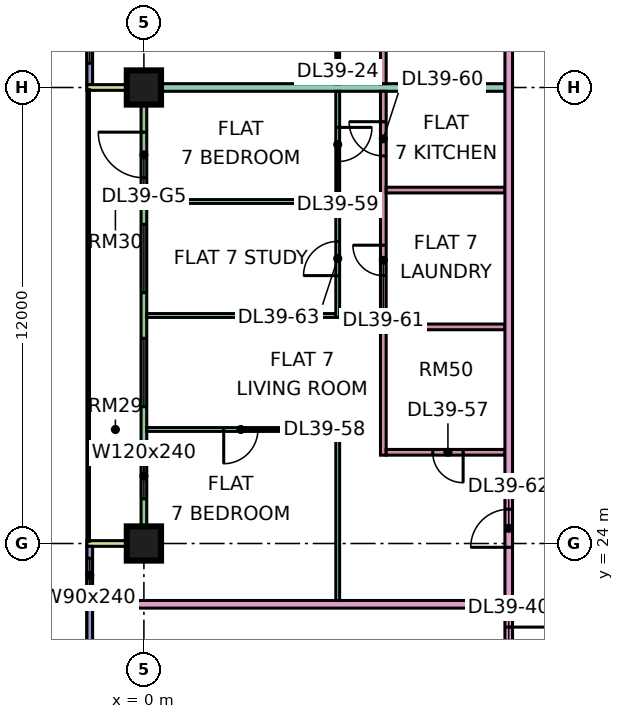
"""IFC4 building model, lengths in metres.
Left out: names, types, materials, properties, quantities, classifications, styles, units other than length and angle.
Written with IfcOpenShell. Run it as: python <this file> out.ifc"""

import sys

from ifc_helpers import new_model, si_unit, direction, frame, frame_2d, origin, origin_2d, place, context, subcontext, project, spatial, rectangle, extrude, element, fill, save


model = new_model("IFC4")
c1 = context("Model", 3, precision=1e-05, world=origin(), true_north=direction((0.0, 1.0)))
c2 = subcontext(c1, "Body", "Model", "MODEL_VIEW")
j1 = project(units=[si_unit("LENGTHUNIT", "METRE"), si_unit("PLANEANGLEUNIT", "RADIAN")], contexts=[c1])
p1 = place(None, origin())
s1 = spatial("IfcSite", under=j1, at=p1, CompositionType="ELEMENT")
p2 = place(p1, origin())
s2 = spatial("IfcBuilding", under=s1, at=p2, CompositionType="ELEMENT")
p3 = place(p2, frame((0.0, 0.0, 172.4)))
s3 = spatial("IfcBuildingStorey", under=s2, at=p3, CompositionType="ELEMENT", Elevation=172.4)
p4 = place(p3, frame((0.0, 24.0, 0.0), z_axis=(0.0, 0.0, 1.0), x_axis=(1.0, 0.0, 0.0)))
e1 = element("IfcColumn", 1, at=p4, inside=s3, PredefinedType="COLUMN", context=c2, shape_type="SweptSolid", body=[
    extrude(rectangle(XDim=0.9, YDim=0.9, at=origin_2d()), origin(), (0.0, 0.0, 1.0), 3.75),
])
p5 = place(p3, frame((0.0, 36.0, 0.0), z_axis=(0.0, 0.0, 1.0), x_axis=(1.0, 0.0, 0.0)))
e2 = element("IfcColumn", 2, at=p5, inside=s3, PredefinedType="COLUMN", context=c2, shape_type="SweptSolid", body=[
    extrude(rectangle(XDim=0.9, YDim=0.9, at=origin_2d()), origin(), (0.0, 0.0, 1.0), 3.75),
])
p6 = place(p3, frame((-1.425, 47.925, 0.0), z_axis=(0.0, 0.0, 1.0), x_axis=(0.0, -1.0, 0.0)))
e3 = element("IfcWall", 3, at=p6, inside=s3, PredefinedType="SOLIDWALL", context=c2, shape_type="SweptSolid", body=[
    extrude(rectangle(XDim=11.85, YDim=0.15, at=frame_2d((5.925, 0.0))), origin(), (0.0, 0.0, 1.0), 3.35),
])
p7 = place(p6, frame((0.562, 0.0, 0.45)))
e4 = element("IfcOpeningElement", 4, at=p7, cuts=e3, PredefinedType="OPENING", context=c2, shape_type="SweptSolid", body=[
    extrude(rectangle(XDim=1.8, YDim=2.4, at=frame_2d((0.9, 1.2))), frame((0.0, 0.085, 0.0), z_axis=(0.0, -1.0, 0.0), x_axis=(1.0, 0.0, 0.0)), (0.0, 0.0, 1.0), 0.17),
])
p8 = place(p6, frame((3.525, 0.0, 0.45)))
e5 = element("IfcOpeningElement", 5, at=p8, cuts=e3, PredefinedType="OPENING", context=c2, shape_type="SweptSolid", body=[
    extrude(rectangle(XDim=1.8, YDim=2.4, at=frame_2d((0.9, 1.2))), frame((0.0, 0.085, 0.0), z_axis=(0.0, -1.0, 0.0), x_axis=(1.0, 0.0, 0.0)), (0.0, 0.0, 1.0), 0.17),
])
p9 = place(p6, frame((6.525, 0.0, 0.45)))
e6 = element("IfcOpeningElement", 6, at=p9, cuts=e3, PredefinedType="OPENING", context=c2, shape_type="SweptSolid", body=[
    extrude(rectangle(XDim=1.8, YDim=2.4, at=frame_2d((0.9, 1.2))), frame((0.0, 0.085, 0.0), z_axis=(0.0, -1.0, 0.0), x_axis=(1.0, 0.0, 0.0)), (0.0, 0.0, 1.0), 0.17),
])
p10 = place(p6, frame((9.488, 0.0, 0.45)))
e7 = element("IfcOpeningElement", 7, at=p10, cuts=e3, PredefinedType="OPENING", context=c2, shape_type="SweptSolid", body=[
    extrude(rectangle(XDim=1.8, YDim=2.4, at=frame_2d((0.9, 1.2))), frame((0.0, 0.085, 0.0), z_axis=(0.0, -1.0, 0.0), x_axis=(1.0, 0.0, 0.0)), (0.0, 0.0, 1.0), 0.17),
])
p11 = place(p3, frame((0.0, 35.925, 0.0), z_axis=(0.0, 0.0, 1.0), x_axis=(0.0, -1.0, 0.0)))
e8 = element("IfcWall", 8, at=p11, inside=s3, PredefinedType="SOLIDWALL", context=c2, shape_type="SweptSolid", body=[
    extrude(rectangle(XDim=11.85, YDim=0.15, at=frame_2d((5.925, 0.0))), origin(), (0.0, 0.0, 1.0), 3.35),
])
p12 = place(p11, frame((1.1, 0.0, 0.0)))
e9 = element("IfcOpeningElement", 9, at=p12, cuts=e8, PredefinedType="OPENING", context=c2, shape_type="SweptSolid", body=[
    extrude(rectangle(XDim=1.2, YDim=2.4, at=frame_2d((0.6, 1.2))), frame((0.0, 0.085, 0.0), z_axis=(0.0, -1.0, 0.0), x_axis=(1.0, 0.0, 0.0)), (0.0, 0.0, 1.0), 0.17),
])
p13 = place(p11, frame((3.525, 0.0, 0.45)))
e10 = element("IfcOpeningElement", 10, at=p13, cuts=e8, PredefinedType="OPENING", context=c2, shape_type="SweptSolid", body=[
    extrude(rectangle(XDim=1.8, YDim=2.4, at=frame_2d((0.9, 1.2))), frame((0.0, 0.085, 0.0), z_axis=(0.0, -1.0, 0.0), x_axis=(1.0, 0.0, 0.0)), (0.0, 0.0, 1.0), 0.17),
])
p14 = place(p11, frame((6.525, 0.0, 0.45)))
e11 = element("IfcOpeningElement", 11, at=p14, cuts=e8, PredefinedType="OPENING", context=c2, shape_type="SweptSolid", body=[
    extrude(rectangle(XDim=1.8, YDim=2.4, at=frame_2d((0.9, 1.2))), frame((0.0, 0.085, 0.0), z_axis=(0.0, -1.0, 0.0), x_axis=(1.0, 0.0, 0.0)), (0.0, 0.0, 1.0), 0.17),
])
p15 = place(p11, frame((9.55, 0.0, 0.45)))
e12 = element("IfcOpeningElement", 12, at=p15, cuts=e8, PredefinedType="OPENING", context=c2, shape_type="SweptSolid", body=[
    extrude(rectangle(XDim=1.2, YDim=2.4, at=frame_2d((0.6, 1.2))), frame((0.0, 0.085, 0.0), z_axis=(0.0, -1.0, 0.0), x_axis=(1.0, 0.0, 0.0)), (0.0, 0.0, 1.0), 0.17),
])
for number, where, z_axis, x_axis in (
    (13, (-1.5, 36.0, 0.0), (0.0, 0.0, 1.0), (1.0, 0.0, 0.0)),
    (14, (-1.5, 24.0, 0.0), (0.0, 0.0, 1.0), (1.0, 0.0, 0.0)),
):
    element("IfcWall", number, at=place(p3, frame(where, z_axis=z_axis, x_axis=x_axis)), inside=s3, PredefinedType="SOLIDWALL", context=c2, shape_type="SweptSolid", body=[
        extrude(rectangle(XDim=1.5, YDim=0.15, at=frame_2d((0.75, 0.0))), origin(), (0.0, 0.0, 1.0), 3.35),
    ])
p16 = place(p3, frame((-1.425, 23.925, 0.0), z_axis=(0.0, 0.0, 1.0), x_axis=(0.0, -1.0, 0.0)))
e15 = element("IfcWall", 15, at=p16, inside=s3, PredefinedType="SOLIDWALL", context=c2, shape_type="SweptSolid", body=[
    extrude(rectangle(XDim=11.425, YDim=0.15, at=frame_2d((5.712, 0.0))), origin(), (0.0, 0.0, 1.0), 3.35),
])
p17 = place(p16, frame((0.312, 0.0, 0.45)))
e16 = element("IfcOpeningElement", 16, at=p17, cuts=e15, PredefinedType="OPENING", context=c2, shape_type="SweptSolid", body=[
    extrude(rectangle(XDim=0.9, YDim=2.4, at=frame_2d((0.45, 1.2))), frame((0.0, 0.085, 0.0), z_axis=(0.0, -1.0, 0.0), x_axis=(1.0, 0.0, 0.0)), (0.0, 0.0, 1.0), 0.17),
])
p18 = place(p16, frame((6.175, 0.0, 0.45)))
e17 = element("IfcOpeningElement", 17, at=p18, cuts=e15, PredefinedType="OPENING", context=c2, shape_type="SweptSolid", body=[
    extrude(rectangle(XDim=3.0, YDim=2.4, at=frame_2d((1.5, 1.2))), frame((0.0, 0.085, 0.0), z_axis=(0.0, -1.0, 0.0), x_axis=(1.0, 0.0, 0.0)), (0.0, 0.0, 1.0), 0.17),
])
p19 = place(p3, frame((-1.35, 22.4, 0.0), z_axis=(0.0, 0.0, 1.0), x_axis=(1.0, 0.0, 0.0)))
e18 = element("IfcWall", 18, at=p19, inside=s3, PredefinedType="PARTITIONING", context=c2, shape_type="SweptSolid", body=[
    extrude(rectangle(XDim=10.85, YDim=0.2, at=frame_2d((5.425, 0.0))), origin(), (0.0, 0.0, 1.0), 3.35),
])
e19 = element("IfcWall", 19, at=p5, inside=s3, PredefinedType="PARTITIONING", context=c2, shape_type="SweptSolid", body=[
    extrude(rectangle(XDim=9.5, YDim=0.2, at=frame_2d((4.75, 0.0))), origin(), (0.0, 0.0, 1.0), 3.35),
])
p20 = place(p3, frame((0.074, 27.0, 0.0), z_axis=(0.0, 0.0, 1.0), x_axis=(1.0, 0.0, 0.0)))
e20 = element("IfcWall", 20, at=p20, inside=s3, PredefinedType="PARTITIONING", context=c2, shape_type="SweptSolid", body=[
    extrude(rectangle(XDim=5.076, YDim=0.1, at=frame_2d((2.538, 0.0))), origin(), (0.0, 0.0, 1.0), 3.35),
])
p21 = place(p20, frame((2.026, 0.0, 0.0)))
e21 = element("IfcOpeningElement", 21, at=p21, cuts=e20, PredefinedType="OPENING", context=c2, shape_type="SweptSolid", body=[
    extrude(rectangle(XDim=0.9, YDim=2.1, at=frame_2d((0.45, 1.05))), frame((0.0, 0.06, 0.0), z_axis=(0.0, -1.0, 0.0), x_axis=(1.0, 0.0, 0.0)), (0.0, 0.0, 1.0), 0.12),
])
for number, where, z_axis, x_axis in (
    (22, (0.074, 30.0, 0.0), (0.0, 0.0, 1.0), (1.0, 0.0, 0.0)),
    (23, (0.074, 33.0, 0.0), (0.0, 0.0, 1.0), (1.0, 0.0, 0.0)),
):
    element("IfcWall", number, at=place(p3, frame(where, z_axis=z_axis, x_axis=x_axis)), inside=s3, PredefinedType="PARTITIONING", context=c2, shape_type="SweptSolid", body=[
        extrude(rectangle(XDim=4.976, YDim=0.1, at=frame_2d((2.488, 0.0))), origin(), (0.0, 0.0, 1.0), 3.35),
    ])
p22 = place(p3, frame((5.1, 22.5, 0.0), z_axis=(0.0, 0.0, 1.0), x_axis=(0.0, 1.0, 0.0)))
e24 = element("IfcWall", 24, at=p22, inside=s3, PredefinedType="PARTITIONING", context=c2, shape_type="SweptSolid", body=[
    extrude(rectangle(XDim=4.45, YDim=0.1, at=frame_2d((2.225, 0.0))), origin(), (0.0, 0.0, 1.0), 3.35),
])
p23 = place(p3, frame((5.1, 29.95, 0.0), z_axis=(0.0, 0.0, 1.0), x_axis=(0.0, 1.0, 0.0)))
e25 = element("IfcWall", 25, at=p23, inside=s3, PredefinedType="PARTITIONING", context=c2, shape_type="SweptSolid", body=[
    extrude(rectangle(XDim=5.95, YDim=0.1, at=frame_2d((2.975, 0.0))), origin(), (0.0, 0.0, 1.0), 3.35),
])
p24 = place(p23, frame((4.1, 0.0, 0.0)))
e26 = element("IfcOpeningElement", 26, at=p24, cuts=e25, PredefinedType="OPENING", context=c2, shape_type="SweptSolid", body=[
    extrude(rectangle(XDim=0.9, YDim=2.1, at=frame_2d((0.45, 1.05))), frame((0.0, 0.06, 0.0), z_axis=(0.0, -1.0, 0.0), x_axis=(1.0, 0.0, 0.0)), (0.0, 0.0, 1.0), 0.12),
])
p25 = place(p23, frame((1.1, 0.0, 0.0)))
e27 = element("IfcOpeningElement", 27, at=p25, cuts=e25, PredefinedType="OPENING", context=c2, shape_type="SweptSolid", body=[
    extrude(rectangle(XDim=0.9, YDim=2.1, at=frame_2d((0.45, 1.05))), frame((0.0, 0.06, 0.0), z_axis=(0.0, -1.0, 0.0), x_axis=(1.0, 0.0, 0.0)), (0.0, 0.0, 1.0), 0.12),
])
p26 = place(p3, frame((5.1, 36.1, 0.0), z_axis=(0.0, 0.0, 1.0), x_axis=(0.0, 1.0, 0.0)))
e28 = element("IfcWall", 28, at=p26, inside=s3, PredefinedType="PARTITIONING", context=c2, shape_type="SweptSolid", body=[
    extrude(rectangle(XDim=26.826, YDim=0.1, at=frame_2d((13.413, 0.0))), origin(), (0.0, 0.0, 1.0), 3.35),
])
p27 = place(p26, frame((0.95, 0.0, 0.0)))
e29 = element("IfcOpeningElement", 29, at=p27, cuts=e28, PredefinedType="OPENING", context=c2, shape_type="SweptSolid", body=[
    extrude(rectangle(XDim=0.9, YDim=2.1, at=frame_2d((0.45, 1.05))), frame((0.0, 0.06, 0.0), z_axis=(0.0, -1.0, 0.0), x_axis=(1.0, 0.0, 0.0)), (0.0, 0.0, 1.0), 0.12),
])
p28 = place(p26, frame((3.95, 0.0, 0.0)))
e30 = element("IfcOpeningElement", 30, at=p28, cuts=e28, PredefinedType="OPENING", context=c2, shape_type="SweptSolid", body=[
    extrude(rectangle(XDim=0.9, YDim=2.1, at=frame_2d((0.45, 1.05))), frame((0.0, 0.06, 0.0), z_axis=(0.0, -1.0, 0.0), x_axis=(1.0, 0.0, 0.0)), (0.0, 0.0, 1.0), 0.12),
])
p29 = place(p26, frame((9.95, 0.0, 0.0)))
e31 = element("IfcOpeningElement", 31, at=p29, cuts=e28, PredefinedType="OPENING", context=c2, shape_type="SweptSolid", body=[
    extrude(rectangle(XDim=0.9, YDim=2.1, at=frame_2d((0.45, 1.05))), frame((0.0, 0.06, 0.0), z_axis=(0.0, -1.0, 0.0), x_axis=(1.0, 0.0, 0.0)), (0.0, 0.0, 1.0), 0.12),
])
p30 = place(p26, frame((21.95, 0.0, 0.0)))
e32 = element("IfcOpeningElement", 32, at=p30, cuts=e28, PredefinedType="OPENING", context=c2, shape_type="SweptSolid", body=[
    extrude(rectangle(XDim=0.9, YDim=2.1, at=frame_2d((0.45, 1.05))), frame((0.0, 0.06, 0.0), z_axis=(0.0, -1.0, 0.0), x_axis=(1.0, 0.0, 0.0)), (0.0, 0.0, 1.0), 0.12),
])
p31 = place(p26, frame((24.95, 0.0, 0.0)))
e33 = element("IfcOpeningElement", 33, at=p31, cuts=e28, PredefinedType="OPENING", context=c2, shape_type="SweptSolid", body=[
    extrude(rectangle(XDim=0.9, YDim=2.1, at=frame_2d((0.45, 1.05))), frame((0.0, 0.06, 0.0), z_axis=(0.0, -1.0, 0.0), x_axis=(1.0, 0.0, 0.0)), (0.0, 0.0, 1.0), 0.12),
])
p32 = place(p26, frame((15.95, 0.0, 0.0)))
e34 = element("IfcOpeningElement", 34, at=p32, cuts=e28, PredefinedType="OPENING", context=c2, shape_type="SweptSolid", body=[
    extrude(rectangle(XDim=0.9, YDim=2.1, at=frame_2d((0.45, 1.05))), frame((0.0, 0.06, 0.0), z_axis=(0.0, -1.0, 0.0), x_axis=(1.0, 0.0, 0.0)), (0.0, 0.0, 1.0), 0.12),
])
p33 = place(p26, frame((6.95, 0.0, 0.0)))
e35 = element("IfcOpeningElement", 35, at=p33, cuts=e28, PredefinedType="OPENING", context=c2, shape_type="SweptSolid", body=[
    extrude(rectangle(XDim=0.9, YDim=2.1, at=frame_2d((0.45, 1.05))), frame((0.0, 0.06, 0.0), z_axis=(0.0, -1.0, 0.0), x_axis=(1.0, 0.0, 0.0)), (0.0, 0.0, 1.0), 0.12),
])
p34 = place(p3, frame((6.3, 26.325, 0.0), z_axis=(0.0, 0.0, 1.0), x_axis=(0.0, 1.0, 0.0)))
e36 = element("IfcWall", 36, at=p34, inside=s3, PredefinedType="PARTITIONING", context=c2, shape_type="SweptSolid", body=[
    extrude(rectangle(XDim=9.575, YDim=0.15, at=frame_2d((4.788, 0.0))), origin(), (0.0, 0.0, 1.0), 3.35),
])
p35 = place(p34, frame((7.875, 0.0, 0.0)))
e37 = element("IfcOpeningElement", 37, at=p35, cuts=e36, PredefinedType="OPENING", context=c2, shape_type="SweptSolid", body=[
    extrude(rectangle(XDim=0.9, YDim=2.1, at=frame_2d((0.45, 1.05))), frame((0.0, 0.085, 0.0), z_axis=(0.0, -1.0, 0.0), x_axis=(1.0, 0.0, 0.0)), (0.0, 0.0, 1.0), 0.17),
])
p36 = place(p34, frame((4.725, 0.0, 0.0)))
e38 = element("IfcOpeningElement", 38, at=p36, cuts=e36, PredefinedType="OPENING", context=c2, shape_type="SweptSolid", body=[
    extrude(rectangle(XDim=0.8, YDim=2.1, at=frame_2d((0.4, 1.05))), frame((0.0, 0.085, 0.0), z_axis=(0.0, -1.0, 0.0), x_axis=(1.0, 0.0, 0.0)), (0.0, 0.0, 1.0), 0.17),
])
p37 = place(p3, frame((6.3, 36.1, 0.0), z_axis=(0.0, 0.0, 1.0), x_axis=(0.0, 1.0, 0.0)))
e39 = element("IfcWall", 39, at=p37, inside=s3, PredefinedType="PARTITIONING", context=c2, shape_type="SweptSolid", body=[
    extrude(rectangle(XDim=14.375, YDim=0.15, at=frame_2d((7.188, 0.0))), origin(), (0.0, 0.0, 1.0), 3.35),
])
p38 = place(p37, frame((2.15, 0.0, 0.0)))
e40 = element("IfcOpeningElement", 40, at=p38, cuts=e39, PredefinedType="OPENING", context=c2, shape_type="SweptSolid", body=[
    extrude(rectangle(XDim=0.9, YDim=2.1, at=frame_2d((0.45, 1.05))), frame((0.0, 0.085, 0.0), z_axis=(0.0, -1.0, 0.0), x_axis=(1.0, 0.0, 0.0)), (0.0, 0.0, 1.0), 0.17),
])
p39 = place(p37, frame((9.35, 0.0, 0.0)))
e41 = element("IfcOpeningElement", 41, at=p39, cuts=e39, PredefinedType="OPENING", context=c2, shape_type="SweptSolid", body=[
    extrude(rectangle(XDim=0.8, YDim=2.1, at=frame_2d((0.4, 1.05))), frame((0.0, 0.085, 0.0), z_axis=(0.0, -1.0, 0.0), x_axis=(1.0, 0.0, 0.0)), (0.0, 0.0, 1.0), 0.17),
])
p40 = place(p37, frame((6.35, 0.0, 0.0)))
e42 = element("IfcOpeningElement", 42, at=p40, cuts=e39, PredefinedType="OPENING", context=c2, shape_type="SweptSolid", body=[
    extrude(rectangle(XDim=0.8, YDim=2.1, at=frame_2d((0.4, 1.05))), frame((0.0, 0.085, 0.0), z_axis=(0.0, -1.0, 0.0), x_axis=(1.0, 0.0, 0.0)), (0.0, 0.0, 1.0), 0.17),
])
p41 = place(p37, frame((12.35, 0.0, 0.0)))
e43 = element("IfcOpeningElement", 43, at=p41, cuts=e39, PredefinedType="OPENING", context=c2, shape_type="SweptSolid", body=[
    extrude(rectangle(XDim=0.8, YDim=2.1, at=frame_2d((0.4, 1.05))), frame((0.0, 0.085, 0.0), z_axis=(0.0, -1.0, 0.0), x_axis=(1.0, 0.0, 0.0)), (0.0, 0.0, 1.0), 0.17),
])
p42 = place(p3, frame((6.375, 26.4, 0.0), z_axis=(0.0, 0.0, 1.0), x_axis=(1.0, 0.0, 0.0)))
e44 = element("IfcWall", 44, at=p42, inside=s3, PredefinedType="PARTITIONING", context=c2, shape_type="SweptSolid", body=[
    extrude(rectangle(XDim=3.125, YDim=0.15, at=frame_2d((1.562, 0.0))), origin(), (0.0, 0.0, 1.0), 3.35),
])
p43 = place(p42, frame((1.225, 0.0, 0.0)))
e45 = element("IfcOpeningElement", 45, at=p43, cuts=e44, PredefinedType="OPENING", context=c2, shape_type="SweptSolid", body=[
    extrude(rectangle(XDim=0.8, YDim=2.1, at=frame_2d((0.4, 1.05))), frame((0.0, 0.085, 0.0), z_axis=(0.0, -1.0, 0.0), x_axis=(1.0, 0.0, 0.0)), (0.0, 0.0, 1.0), 0.17),
])
for number, where, z_axis, x_axis in (
    (46, (6.375, 29.7, 0.0), (0.0, 0.0, 1.0), (1.0, 0.0, 0.0)),
    (47, (6.375, 33.3, 0.0), (0.0, 0.0, 1.0), (1.0, 0.0, 0.0)),
):
    element("IfcWall", number, at=place(p3, frame(where, z_axis=z_axis, x_axis=x_axis)), inside=s3, PredefinedType="PARTITIONING", context=c2, shape_type="SweptSolid", body=[
        extrude(rectangle(XDim=3.125, YDim=0.15, at=frame_2d((1.562, 0.0))), origin(), (0.0, 0.0, 1.0), 3.35),
    ])
p44 = place(p3, frame((9.6, 20.0, 0.0), z_axis=(0.0, 0.0, 1.0), x_axis=(0.0, 1.0, 0.0)))
e48 = element("IfcWall", 48, at=p44, inside=s3, PredefinedType="PARTITIONING", context=c2, shape_type="SweptSolid", body=[
    extrude(rectangle(XDim=42.926, YDim=0.2, at=frame_2d((21.463, 0.0))), origin(), (0.0, 0.0, 1.0), 3.35),
])
p45 = place(p44, frame((31.35, 0.0, 0.0)))
e49 = element("IfcOpeningElement", 49, at=p45, cuts=e48, PredefinedType="OPENING", context=c2, shape_type="SweptSolid", body=[
    extrude(rectangle(XDim=1.0, YDim=2.1, at=frame_2d((0.5, 1.05))), frame((0.0, 0.11, 0.0), z_axis=(0.0, -1.0, 0.0), x_axis=(1.0, 0.0, 0.0)), (0.0, 0.0, 1.0), 0.22),
])
p46 = place(p44, frame((0.6, 0.0, 0.0)))
e50 = element("IfcOpeningElement", 50, at=p46, cuts=e48, PredefinedType="OPENING", context=c2, shape_type="SweptSolid", body=[
    extrude(rectangle(XDim=1.2, YDim=2.1, at=frame_2d((0.6, 1.05))), frame((0.0, 0.11, 0.0), z_axis=(0.0, -1.0, 0.0), x_axis=(1.0, 0.0, 0.0)), (0.0, 0.0, 1.0), 0.22),
])
p47 = place(p44, frame((3.9, 0.0, 0.0)))
e51 = element("IfcOpeningElement", 51, at=p47, cuts=e48, PredefinedType="OPENING", context=c2, shape_type="SweptSolid", body=[
    extrude(rectangle(XDim=1.0, YDim=2.1, at=frame_2d((0.5, 1.05))), frame((0.0, 0.11, 0.0), z_axis=(0.0, -1.0, 0.0), x_axis=(1.0, 0.0, 0.0)), (0.0, 0.0, 1.0), 0.22),
])
p48 = place(p10, origin())
e52 = element("IfcWindow", 52, at=p48, inside=s3, PartitioningType="SINGLE_PANEL", PredefinedType="WINDOW", context=c2, shape_type="SweptSolid", body=[
    extrude(rectangle(XDim=1.8, YDim=2.4, at=frame_2d((0.9, 1.2))), frame((0.0, 0.03, 0.0), z_axis=(0.0, -1.0, 0.0), x_axis=(1.0, 0.0, 0.0)), (0.0, 0.0, 1.0), 0.06),
])
fill(e7, e52)
p49 = place(p12, frame((1.2, 0.0, 0.0), z_axis=(0.0, 0.0, 1.0), x_axis=(-1.0, 0.0, 0.0)))
e53 = element("IfcDoor", 53, at=p49, inside=s3, OperationType="DOUBLE_DOOR_SINGLE_SWING", PredefinedType="DOOR", context=c2, shape_type="SweptSolid", body=[
    extrude(rectangle(XDim=1.2, YDim=2.4, at=frame_2d((0.6, 1.2))), frame((0.0, 0.025, 0.0), z_axis=(0.0, -1.0, 0.0), x_axis=(1.0, 0.0, 0.0)), (0.0, 0.0, 1.0), 0.05),
])
fill(e9, e53)
p50 = place(p13, origin())
e54 = element("IfcWindow", 54, at=p50, inside=s3, PartitioningType="SINGLE_PANEL", PredefinedType="WINDOW", context=c2, shape_type="SweptSolid", body=[
    extrude(rectangle(XDim=1.8, YDim=2.4, at=frame_2d((0.9, 1.2))), frame((0.0, 0.03, 0.0), z_axis=(0.0, -1.0, 0.0), x_axis=(1.0, 0.0, 0.0)), (0.0, 0.0, 1.0), 0.06),
])
fill(e10, e54)
p51 = place(p14, origin())
e55 = element("IfcWindow", 55, at=p51, inside=s3, PartitioningType="SINGLE_PANEL", PredefinedType="WINDOW", context=c2, shape_type="SweptSolid", body=[
    extrude(rectangle(XDim=1.8, YDim=2.4, at=frame_2d((0.9, 1.2))), frame((0.0, 0.03, 0.0), z_axis=(0.0, -1.0, 0.0), x_axis=(1.0, 0.0, 0.0)), (0.0, 0.0, 1.0), 0.06),
])
fill(e11, e55)
p52 = place(p15, origin())
e56 = element("IfcWindow", 56, at=p52, inside=s3, PartitioningType="SINGLE_PANEL", PredefinedType="WINDOW", context=c2, shape_type="SweptSolid", body=[
    extrude(rectangle(XDim=1.2, YDim=2.4, at=frame_2d((0.6, 1.2))), frame((0.0, 0.03, 0.0), z_axis=(0.0, -1.0, 0.0), x_axis=(1.0, 0.0, 0.0)), (0.0, 0.0, 1.0), 0.06),
])
fill(e12, e56)
p53 = place(p17, origin())
e57 = element("IfcWindow", 57, at=p53, inside=s3, PartitioningType="SINGLE_PANEL", PredefinedType="WINDOW", context=c2, shape_type="SweptSolid", body=[
    extrude(rectangle(XDim=0.9, YDim=2.4, at=frame_2d((0.45, 1.2))), frame((0.0, 0.03, 0.0), z_axis=(0.0, -1.0, 0.0), x_axis=(1.0, 0.0, 0.0)), (0.0, 0.0, 1.0), 0.06),
])
fill(e16, e57)
p54 = place(p46, origin())
e58 = element("IfcDoor", 58, at=p54, inside=s3, OperationType="SINGLE_SWING_RIGHT", PredefinedType="DOOR", context=c2, shape_type="SweptSolid", body=[
    extrude(rectangle(XDim=1.2, YDim=2.1, at=frame_2d((0.6, 1.05))), frame((0.0, 0.025, 0.0), z_axis=(0.0, -1.0, 0.0), x_axis=(1.0, 0.0, 0.0)), (0.0, 0.0, 1.0), 0.05),
])
fill(e50, e58)
p55 = place(p43, origin())
e59 = element("IfcDoor", 59, at=p55, inside=s3, OperationType="SINGLE_SWING_RIGHT", PredefinedType="DOOR", context=c2, shape_type="SweptSolid", body=[
    extrude(rectangle(XDim=0.8, YDim=2.1, at=frame_2d((0.4, 1.05))), frame((0.0, 0.025, 0.0), z_axis=(0.0, -1.0, 0.0), x_axis=(1.0, 0.0, 0.0)), (0.0, 0.0, 1.0), 0.05),
])
fill(e45, e59)
p56 = place(p21, frame((0.9, 0.0, 0.0), z_axis=(0.0, 0.0, 1.0), x_axis=(-1.0, 0.0, 0.0)))
e60 = element("IfcDoor", 60, at=p56, inside=s3, OperationType="SINGLE_SWING_LEFT", PredefinedType="DOOR", context=c2, shape_type="SweptSolid", body=[
    extrude(rectangle(XDim=0.9, YDim=2.1, at=frame_2d((0.45, 1.05))), frame((0.0, 0.025, 0.0), z_axis=(0.0, -1.0, 0.0), x_axis=(1.0, 0.0, 0.0)), (0.0, 0.0, 1.0), 0.05),
])
fill(e21, e60)
p57 = place(p24, origin())
e61 = element("IfcDoor", 61, at=p57, inside=s3, OperationType="SINGLE_SWING_RIGHT", PredefinedType="DOOR", context=c2, shape_type="SweptSolid", body=[
    extrude(rectangle(XDim=0.9, YDim=2.1, at=frame_2d((0.45, 1.05))), frame((0.0, 0.025, 0.0), z_axis=(0.0, -1.0, 0.0), x_axis=(1.0, 0.0, 0.0)), (0.0, 0.0, 1.0), 0.05),
])
fill(e26, e61)
p58 = place(p35, frame((0.9, 0.0, 0.0), z_axis=(0.0, 0.0, 1.0), x_axis=(-1.0, 0.0, 0.0)))
e62 = element("IfcDoor", 62, at=p58, inside=s3, OperationType="SINGLE_SWING_RIGHT", PredefinedType="DOOR", context=c2, shape_type="SweptSolid", body=[
    extrude(rectangle(XDim=0.9, YDim=2.1, at=frame_2d((0.45, 1.05))), frame((0.0, 0.025, 0.0), z_axis=(0.0, -1.0, 0.0), x_axis=(1.0, 0.0, 0.0)), (0.0, 0.0, 1.0), 0.05),
])
fill(e37, e62)
p59 = place(p36, frame((0.8, 0.0, 0.0), z_axis=(0.0, 0.0, 1.0), x_axis=(-1.0, 0.0, 0.0)))
e63 = element("IfcDoor", 63, at=p59, inside=s3, OperationType="SINGLE_SWING_RIGHT", PredefinedType="DOOR", context=c2, shape_type="SweptSolid", body=[
    extrude(rectangle(XDim=0.8, YDim=2.1, at=frame_2d((0.4, 1.05))), frame((0.0, 0.025, 0.0), z_axis=(0.0, -1.0, 0.0), x_axis=(1.0, 0.0, 0.0)), (0.0, 0.0, 1.0), 0.05),
])
fill(e38, e63)
p60 = place(p47, origin())
e64 = element("IfcDoor", 64, at=p60, inside=s3, OperationType="SINGLE_SWING_LEFT", PredefinedType="DOOR", context=c2, shape_type="SweptSolid", body=[
    extrude(rectangle(XDim=1.0, YDim=2.1, at=frame_2d((0.5, 1.05))), frame((0.0, 0.025, 0.0), z_axis=(0.0, -1.0, 0.0), x_axis=(1.0, 0.0, 0.0)), (0.0, 0.0, 1.0), 0.05),
])
fill(e51, e64)
p61 = place(p25, origin())
e65 = element("IfcDoor", 65, at=p61, inside=s3, OperationType="SINGLE_SWING_LEFT", PredefinedType="DOOR", context=c2, shape_type="SweptSolid", body=[
    extrude(rectangle(XDim=0.9, YDim=2.1, at=frame_2d((0.45, 1.05))), frame((0.0, 0.025, 0.0), z_axis=(0.0, -1.0, 0.0), x_axis=(1.0, 0.0, 0.0)), (0.0, 0.0, 1.0), 0.05),
])
fill(e27, e65)
save(model, sys.argv[1])
